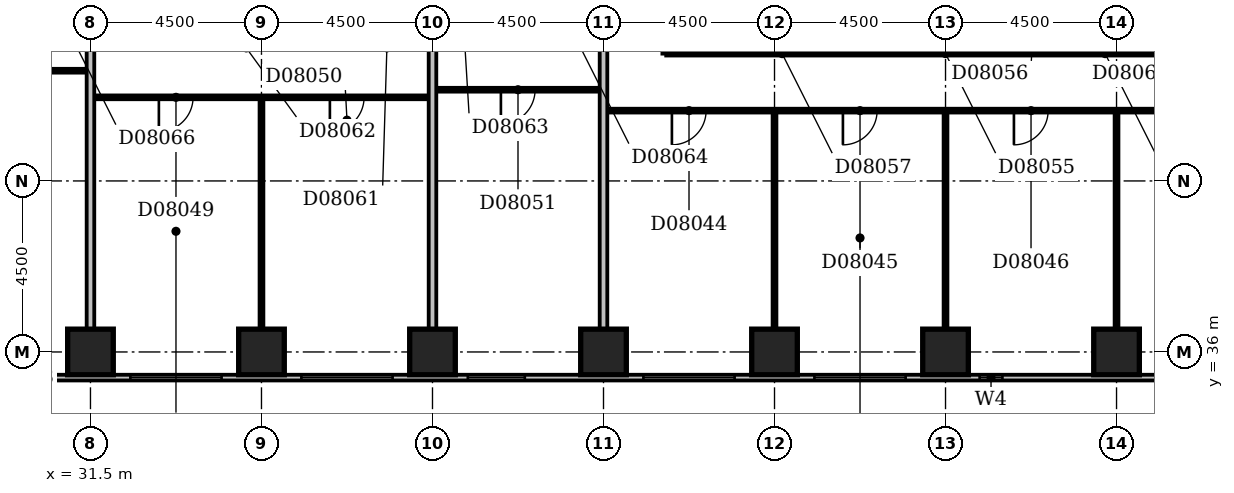
"""IFC4 building model, lengths in metres.
Left out: names, types, materials, properties, quantities, classifications, styles, units other than length and angle.
Written with IfcOpenShell. Run it as: python <this file> out.ifc"""

import sys

from ifc_helpers import new_model, si_unit, direction, frame, frame_2d, origin, origin_2d, place, context, subcontext, project, spatial, rectangle, extrude, element, fill, save


model = new_model("IFC4")
c1 = context("Model", 3, precision=1e-05, world=origin(), true_north=direction((0.0, 1.0)))
c2 = subcontext(c1, "Body", "Model", "MODEL_VIEW")
j1 = project(units=[si_unit("LENGTHUNIT", "METRE"), si_unit("PLANEANGLEUNIT", "RADIAN")], contexts=[c1])
p1 = place(None, origin())
s1 = spatial("IfcSite", under=j1, at=p1, CompositionType="ELEMENT")
p2 = place(p1, origin())
s2 = spatial("IfcBuilding", under=s1, at=p2, CompositionType="ELEMENT")
p3 = place(p2, frame((0.0, 0.0, 39.8)))
s3 = spatial("IfcBuildingStorey", under=s2, at=p3, CompositionType="ELEMENT", Elevation=39.8)
for number, where, z_axis, x_axis in (
    (1, (31.5, 36.0, -0.3), (0.0, 0.0, 1.0), (1.0, 0.0, 0.0)),
    (2, (36.0, 36.0, -0.3), (0.0, 0.0, 1.0), (1.0, 0.0, 0.0)),
    (3, (40.5, 36.0, -0.3), (0.0, 0.0, 1.0), (1.0, 0.0, 0.0)),
    (4, (45.0, 36.0, -0.3), (0.0, 0.0, 1.0), (1.0, 0.0, 0.0)),
    (5, (49.5, 36.0, -0.3), (0.0, 0.0, 1.0), (1.0, 0.0, 0.0)),
    (6, (54.0, 36.0, -0.3), (0.0, 0.0, 1.0), (1.0, 0.0, 0.0)),
    (7, (58.5, 36.0, -0.3), (0.0, 0.0, 1.0), (1.0, 0.0, 0.0)),
):
    element("IfcColumn", number, at=place(p3, frame(where, z_axis=z_axis, x_axis=x_axis)), inside=s3, PredefinedType="COLUMN", context=c2, shape_type="SweptSolid", body=[
        extrude(rectangle(XDim=1.2, YDim=1.2, at=origin_2d()), origin(), (0.0, 0.0, 1.0), 3.6),
    ])
p4 = place(p3, frame((23.1, 35.325, 0.0), z_axis=(0.0, 0.0, 1.0), x_axis=(1.0, 0.0, 0.0)))
e8 = element("IfcWall", 8, at=p4, inside=s3, PredefinedType="STANDARD", context=c2, shape_type="SweptSolid", body=[
    extrude(rectangle(XDim=45.15, YDim=0.15, at=frame_2d((22.575, 0.0))), origin(), (0.0, 0.0, 1.0), 2.7),
])
p5 = place(p4, frame((0.45, 0.0, 0.6)))
e9 = element("IfcOpeningElement", 9, at=p5, cuts=e8, PredefinedType="OPENING", context=c2, shape_type="SweptSolid", body=[
    extrude(rectangle(XDim=2.4, YDim=1.8, at=frame_2d((1.2, 0.9))), frame((0.0, 0.087, 0.0), z_axis=(0.0, -1.0, 0.0), x_axis=(1.0, 0.0, 0.0)), (0.0, 0.0, 1.0), 0.174),
])
p6 = place(p4, frame((6.56, 0.0, 0.6)))
e10 = element("IfcOpeningElement", 10, at=p6, cuts=e8, PredefinedType="OPENING", context=c2, shape_type="SweptSolid", body=[
    extrude(rectangle(XDim=0.9, YDim=1.8, at=frame_2d((0.45, 0.9))), frame((0.0, 0.087, 0.0), z_axis=(0.0, -1.0, 0.0), x_axis=(1.0, 0.0, 0.0)), (0.0, 0.0, 1.0), 0.174),
])
p7 = place(p4, frame((9.45, 0.0, 0.6)))
e11 = element("IfcOpeningElement", 11, at=p7, cuts=e8, PredefinedType="OPENING", context=c2, shape_type="SweptSolid", body=[
    extrude(rectangle(XDim=2.4, YDim=1.8, at=frame_2d((1.2, 0.9))), frame((0.0, 0.087, 0.0), z_axis=(0.0, -1.0, 0.0), x_axis=(1.0, 0.0, 0.0)), (0.0, 0.0, 1.0), 0.174),
])
p8 = place(p4, frame((13.95, 0.0, 0.6)))
e12 = element("IfcOpeningElement", 12, at=p8, cuts=e8, PredefinedType="OPENING", context=c2, shape_type="SweptSolid", body=[
    extrude(rectangle(XDim=2.4, YDim=1.8, at=frame_2d((1.2, 0.9))), frame((0.0, 0.087, 0.0), z_axis=(0.0, -1.0, 0.0), x_axis=(1.0, 0.0, 0.0)), (0.0, 0.0, 1.0), 0.174),
])
p9 = place(p4, frame((18.33, 0.0, 0.6)))
e13 = element("IfcOpeningElement", 13, at=p9, cuts=e8, PredefinedType="OPENING", context=c2, shape_type="SweptSolid", body=[
    extrude(rectangle(XDim=1.5, YDim=1.8, at=frame_2d((0.75, 0.9))), frame((0.0, 0.087, 0.0), z_axis=(0.0, -1.0, 0.0), x_axis=(1.0, 0.0, 0.0)), (0.0, 0.0, 1.0), 0.174),
])
p10 = place(p4, frame((22.95, 0.0, 0.6)))
e14 = element("IfcOpeningElement", 14, at=p10, cuts=e8, PredefinedType="OPENING", context=c2, shape_type="SweptSolid", body=[
    extrude(rectangle(XDim=2.4, YDim=1.8, at=frame_2d((1.2, 0.9))), frame((0.0, 0.087, 0.0), z_axis=(0.0, -1.0, 0.0), x_axis=(1.0, 0.0, 0.0)), (0.0, 0.0, 1.0), 0.174),
])
p11 = place(p4, frame((27.45, 0.0, 0.6)))
e15 = element("IfcOpeningElement", 15, at=p11, cuts=e8, PredefinedType="OPENING", context=c2, shape_type="SweptSolid", body=[
    extrude(rectangle(XDim=2.4, YDim=1.8, at=frame_2d((1.2, 0.9))), frame((0.0, 0.087, 0.0), z_axis=(0.0, -1.0, 0.0), x_axis=(1.0, 0.0, 0.0)), (0.0, 0.0, 1.0), 0.174),
])
p12 = place(p4, frame((31.797, 0.0, 0.6)))
e16 = element("IfcOpeningElement", 16, at=p12, cuts=e8, PredefinedType="OPENING", context=c2, shape_type="SweptSolid", body=[
    extrude(rectangle(XDim=0.6, YDim=1.8, at=frame_2d((0.3, 0.9))), frame((0.0, 0.087, 0.0), z_axis=(0.0, -1.0, 0.0), x_axis=(1.0, 0.0, 0.0)), (0.0, 0.0, 1.0), 0.174),
])
p13 = place(p4, frame((36.45, 0.0, 0.6)))
e17 = element("IfcOpeningElement", 17, at=p13, cuts=e8, PredefinedType="OPENING", context=c2, shape_type="SweptSolid", body=[
    extrude(rectangle(XDim=2.4, YDim=1.8, at=frame_2d((1.2, 0.9))), frame((0.0, 0.087, 0.0), z_axis=(0.0, -1.0, 0.0), x_axis=(1.0, 0.0, 0.0)), (0.0, 0.0, 1.0), 0.174),
])
p14 = place(p4, frame((40.95, 0.0, 0.6)))
e18 = element("IfcOpeningElement", 18, at=p14, cuts=e8, PredefinedType="OPENING", context=c2, shape_type="SweptSolid", body=[
    extrude(rectangle(XDim=2.4, YDim=1.8, at=frame_2d((1.2, 0.9))), frame((0.0, 0.087, 0.0), z_axis=(0.0, -1.0, 0.0), x_axis=(1.0, 0.0, 0.0)), (0.0, 0.0, 1.0), 0.174),
])
p15 = place(p3, frame((31.5, 36.6, 0.0), z_axis=(0.0, 0.0, 1.0), x_axis=(0.0, 1.0, 0.0)))
e19 = element("IfcWall", 19, at=p15, inside=s3, PredefinedType="PARTITIONING", context=c2, shape_type="SweptSolid", body=[
    extrude(rectangle(XDim=12.8, YDim=0.2, at=frame_2d((6.4, 0.0))), origin(), (0.0, 0.0, 1.0), 3.3),
])
p16 = place(p3, frame((36.0, 36.6, 0.0), z_axis=(0.0, 0.0, 1.0), x_axis=(0.0, 1.0, 0.0)))
e20 = element("IfcWall", 20, at=p16, inside=s3, PredefinedType="PARTITIONING", context=c2, shape_type="SweptSolid", body=[
    extrude(rectangle(XDim=6.05, YDim=0.1, at=frame_2d((3.025, 0.0))), origin(), (0.0, 0.0, 1.0), 2.4),
])
p17 = place(p3, frame((40.5, 36.6, 0.0), z_axis=(0.0, 0.0, 1.0), x_axis=(0.0, 1.0, 0.0)))
e21 = element("IfcWall", 21, at=p17, inside=s3, PredefinedType="PARTITIONING", context=c2, shape_type="SweptSolid", body=[
    extrude(rectangle(XDim=12.8, YDim=0.2, at=frame_2d((6.4, 0.0))), origin(), (0.0, 0.0, 1.0), 3.3),
])
p18 = place(p3, frame((45.0, 36.6, 0.0), z_axis=(0.0, 0.0, 1.0), x_axis=(0.0, 1.0, 0.0)))
e22 = element("IfcWall", 22, at=p18, inside=s3, PredefinedType="PARTITIONING", context=c2, shape_type="SweptSolid", body=[
    extrude(rectangle(XDim=12.8, YDim=0.2, at=frame_2d((6.4, 0.0))), origin(), (0.0, 0.0, 1.0), 2.6),
])
p19 = place(p3, frame((49.5, 36.6, 0.0), z_axis=(0.0, 0.0, 1.0), x_axis=(0.0, 1.0, 0.0)))
e23 = element("IfcWall", 23, at=p19, inside=s3, PredefinedType="PARTITIONING", context=c2, shape_type="SweptSolid", body=[
    extrude(rectangle(XDim=5.7, YDim=0.1, at=frame_2d((2.85, 0.0))), origin(), (0.0, 0.0, 1.0), 3.3),
])
p20 = place(p3, frame((54.0, 36.6, 0.0), z_axis=(0.0, 0.0, 1.0), x_axis=(0.0, 1.0, 0.0)))
e24 = element("IfcWall", 24, at=p20, inside=s3, PredefinedType="PARTITIONING", context=c2, shape_type="SweptSolid", body=[
    extrude(rectangle(XDim=5.7, YDim=0.1, at=frame_2d((2.85, 0.0))), origin(), (0.0, 0.0, 1.0), 2.6),
])
p21 = place(p3, frame((58.5, 36.6, 0.0), z_axis=(0.0, 0.0, 1.0), x_axis=(0.0, 1.0, 0.0)))
e25 = element("IfcWall", 25, at=p21, inside=s3, PredefinedType="PARTITIONING", context=c2, shape_type="SweptSolid", body=[
    extrude(rectangle(XDim=5.7, YDim=0.1, at=frame_2d((2.85, 0.0))), origin(), (0.0, 0.0, 1.0), 3.3),
])
p22 = place(p3, frame((45.1, 42.35, 0.0), z_axis=(0.0, 0.0, 1.0), x_axis=(1.0, 0.0, 0.0)))
e26 = element("IfcWall", 26, at=p22, inside=s3, PredefinedType="PARTITIONING", context=c2, shape_type="SweptSolid", body=[
    extrude(rectangle(XDim=17.8, YDim=0.1, at=frame_2d((8.9, 0.0))), origin(), (0.0, 0.0, 1.0), 3.3),
])
p23 = place(p22, frame((1.7, 0.0, 0.0)))
e27 = element("IfcOpeningElement", 27, at=p23, cuts=e26, PredefinedType="OPENING", context=c2, shape_type="SweptSolid", body=[
    extrude(rectangle(XDim=0.9, YDim=2.1, at=frame_2d((0.45, 1.05))), frame((0.0, 0.062, 0.0), z_axis=(0.0, -1.0, 0.0), x_axis=(1.0, 0.0, 0.0)), (0.0, 0.0, 1.0), 0.124),
])
p24 = place(p22, frame((6.2, 0.0, 0.0)))
e28 = element("IfcOpeningElement", 28, at=p24, cuts=e26, PredefinedType="OPENING", context=c2, shape_type="SweptSolid", body=[
    extrude(rectangle(XDim=0.9, YDim=2.1, at=frame_2d((0.45, 1.05))), frame((0.0, 0.062, 0.0), z_axis=(0.0, -1.0, 0.0), x_axis=(1.0, 0.0, 0.0)), (0.0, 0.0, 1.0), 0.124),
])
p25 = place(p22, frame((10.7, 0.0, 0.0)))
e29 = element("IfcOpeningElement", 29, at=p25, cuts=e26, PredefinedType="OPENING", context=c2, shape_type="SweptSolid", body=[
    extrude(rectangle(XDim=0.9, YDim=2.1, at=frame_2d((0.45, 1.05))), frame((0.0, 0.062, 0.0), z_axis=(0.0, -1.0, 0.0), x_axis=(1.0, 0.0, 0.0)), (0.0, 0.0, 1.0), 0.124),
])
p26 = place(p22, frame((15.2, 0.0, 0.0)))
e30 = element("IfcOpeningElement", 30, at=p26, cuts=e26, PredefinedType="OPENING", context=c2, shape_type="SweptSolid", body=[
    extrude(rectangle(XDim=0.9, YDim=2.1, at=frame_2d((0.45, 1.05))), frame((0.0, 0.062, 0.0), z_axis=(0.0, -1.0, 0.0), x_axis=(1.0, 0.0, 0.0)), (0.0, 0.0, 1.0), 0.124),
])
p27 = place(p3, frame((31.6, 42.7, 0.0), z_axis=(0.0, 0.0, 1.0), x_axis=(1.0, 0.0, 0.0)))
e31 = element("IfcWall", 31, at=p27, inside=s3, PredefinedType="PARTITIONING", context=c2, shape_type="SweptSolid", body=[
    extrude(rectangle(XDim=8.8, YDim=0.1, at=frame_2d((4.4, 0.0))), origin(), (0.0, 0.0, 1.0), 3.3),
])
p28 = place(p27, frame((1.7, 0.0, 0.0)))
e32 = element("IfcOpeningElement", 32, at=p28, cuts=e31, PredefinedType="OPENING", context=c2, shape_type="SweptSolid", body=[
    extrude(rectangle(XDim=0.9, YDim=2.1, at=frame_2d((0.45, 1.05))), frame((0.0, 0.062, 0.0), z_axis=(0.0, -1.0, 0.0), x_axis=(1.0, 0.0, 0.0)), (0.0, 0.0, 1.0), 0.124),
])
p29 = place(p27, frame((6.2, 0.0, 0.0)))
e33 = element("IfcOpeningElement", 33, at=p29, cuts=e31, PredefinedType="OPENING", context=c2, shape_type="SweptSolid", body=[
    extrude(rectangle(XDim=0.9, YDim=2.1, at=frame_2d((0.45, 1.05))), frame((0.0, 0.062, 0.0), z_axis=(0.0, -1.0, 0.0), x_axis=(1.0, 0.0, 0.0)), (0.0, 0.0, 1.0), 0.124),
])
p30 = place(p3, frame((40.6, 42.9, 0.0), z_axis=(0.0, 0.0, 1.0), x_axis=(1.0, 0.0, 0.0)))
e34 = element("IfcWall", 34, at=p30, inside=s3, PredefinedType="PARTITIONING", context=c2, shape_type="SweptSolid", body=[
    extrude(rectangle(XDim=4.3, YDim=0.1, at=frame_2d((2.15, 0.0))), origin(), (0.0, 0.0, 1.0), 3.3),
])
p31 = place(p30, frame((1.7, 0.0, 0.0)))
e35 = element("IfcOpeningElement", 35, at=p31, cuts=e34, PredefinedType="OPENING", context=c2, shape_type="SweptSolid", body=[
    extrude(rectangle(XDim=0.9, YDim=2.1, at=frame_2d((0.45, 1.05))), frame((0.0, 0.062, 0.0), z_axis=(0.0, -1.0, 0.0), x_axis=(1.0, 0.0, 0.0)), (0.0, 0.0, 1.0), 0.124),
])
p32 = place(p3, frame((27.1, 43.4, 0.0), z_axis=(0.0, 0.0, 1.0), x_axis=(1.0, 0.0, 0.0)))
e36 = element("IfcWall", 36, at=p32, inside=s3, PredefinedType="PARTITIONING", context=c2, shape_type="SweptSolid", body=[
    extrude(rectangle(XDim=4.3, YDim=0.1, at=frame_2d((2.15, 0.0))), origin(), (0.0, 0.0, 1.0), 3.3),
])
p33 = place(p32, frame((1.7, 0.0, 0.0)))
e37 = element("IfcOpeningElement", 37, at=p33, cuts=e36, PredefinedType="OPENING", context=c2, shape_type="SweptSolid", body=[
    extrude(rectangle(XDim=0.9, YDim=2.1, at=frame_2d((0.45, 1.05))), frame((0.0, 0.062, 0.0), z_axis=(0.0, -1.0, 0.0), x_axis=(1.0, 0.0, 0.0)), (0.0, 0.0, 1.0), 0.124),
])
p34 = place(p3, frame((46.6, 43.85, 0.0), z_axis=(0.0, 0.0, 1.0), x_axis=(0.0, 1.0, 0.0)))
e38 = element("IfcWall", 38, at=p34, inside=s3, PredefinedType="PARTITIONING", context=c2, shape_type="SweptSolid", body=[
    extrude(rectangle(XDim=5.55, YDim=0.1, at=frame_2d((2.775, 0.0))), origin(), (0.0, 0.0, 1.0), 3.3),
])
p35 = place(p3, frame((46.65, 43.85, 0.0), z_axis=(0.0, 0.0, 1.0), x_axis=(1.0, 0.0, 0.0)))
e39 = element("IfcWall", 39, at=p35, inside=s3, PredefinedType="PARTITIONING", context=c2, shape_type="SweptSolid", body=[
    extrude(rectangle(XDim=16.25, YDim=0.1, at=frame_2d((8.125, 0.0))), origin(), (0.0, 0.0, 1.0), 3.3),
])
p36 = place(p35, frame((6.95, 0.0, 0.0)))
e40 = element("IfcOpeningElement", 40, at=p36, cuts=e39, PredefinedType="OPENING", context=c2, shape_type="SweptSolid", body=[
    extrude(rectangle(XDim=0.8, YDim=2.1, at=frame_2d((0.4, 1.05))), frame((0.0, 0.062, 0.0), z_axis=(0.0, -1.0, 0.0), x_axis=(1.0, 0.0, 0.0)), (0.0, 0.0, 1.0), 0.124),
])
p37 = place(p35, frame((9.25, 0.0, 0.0)))
e41 = element("IfcOpeningElement", 41, at=p37, cuts=e39, PredefinedType="OPENING", context=c2, shape_type="SweptSolid", body=[
    extrude(rectangle(XDim=0.8, YDim=2.1, at=frame_2d((0.4, 1.05))), frame((0.0, 0.062, 0.0), z_axis=(0.0, -1.0, 0.0), x_axis=(1.0, 0.0, 0.0)), (0.0, 0.0, 1.0), 0.124),
])
p38 = place(p35, frame((2.6, 0.0, 0.0)))
e42 = element("IfcOpeningElement", 42, at=p38, cuts=e39, PredefinedType="OPENING", context=c2, shape_type="SweptSolid", body=[
    extrude(rectangle(XDim=0.9, YDim=2.1, at=frame_2d((0.45, 1.05))), frame((0.0, 0.062, 0.0), z_axis=(0.0, -1.0, 0.0), x_axis=(1.0, 0.0, 0.0)), (0.0, 0.0, 1.0), 0.124),
])
p39 = place(p35, frame((14.95, 0.0, 0.0)))
e43 = element("IfcOpeningElement", 43, at=p39, cuts=e39, PredefinedType="OPENING", context=c2, shape_type="SweptSolid", body=[
    extrude(rectangle(XDim=0.8, YDim=2.1, at=frame_2d((0.4, 1.05))), frame((0.0, 0.062, 0.0), z_axis=(0.0, -1.0, 0.0), x_axis=(1.0, 0.0, 0.0)), (0.0, 0.0, 1.0), 0.124),
])
p40 = place(p35, frame((11.15, 0.0, 0.0)))
e44 = element("IfcOpeningElement", 44, at=p40, cuts=e39, PredefinedType="OPENING", context=c2, shape_type="SweptSolid", body=[
    extrude(rectangle(XDim=0.8, YDim=2.1, at=frame_2d((0.4, 1.05))), frame((0.0, 0.062, 0.0), z_axis=(0.0, -1.0, 0.0), x_axis=(1.0, 0.0, 0.0)), (0.0, 0.0, 1.0), 0.124),
])
p41 = place(p35, frame((12.95, 0.0, 0.0)))
e45 = element("IfcOpeningElement", 45, at=p41, cuts=e39, PredefinedType="OPENING", context=c2, shape_type="SweptSolid", body=[
    extrude(rectangle(XDim=0.8, YDim=2.1, at=frame_2d((0.4, 1.05))), frame((0.0, 0.062, 0.0), z_axis=(0.0, -1.0, 0.0), x_axis=(1.0, 0.0, 0.0)), (0.0, 0.0, 1.0), 0.124),
])
p42 = place(p6, origin())
e46 = element("IfcWindow", 46, at=p42, inside=s3, PartitioningType="SINGLE_PANEL", PredefinedType="WINDOW", context=c2, shape_type="SweptSolid", body=[
    extrude(rectangle(XDim=0.9, YDim=1.8, at=frame_2d((0.45, 0.9))), frame((0.0, 0.03, 0.0), z_axis=(0.0, -1.0, 0.0), x_axis=(1.0, 0.0, 0.0)), (0.0, 0.0, 1.0), 0.06),
])
fill(e10, e46)
p43 = place(p7, origin())
e47 = element("IfcWindow", 47, at=p43, inside=s3, PartitioningType="SINGLE_PANEL", PredefinedType="WINDOW", context=c2, shape_type="SweptSolid", body=[
    extrude(rectangle(XDim=2.4, YDim=1.8, at=frame_2d((1.2, 0.9))), frame((0.0, 0.03, 0.0), z_axis=(0.0, -1.0, 0.0), x_axis=(1.0, 0.0, 0.0)), (0.0, 0.0, 1.0), 0.06),
])
fill(e11, e47)
p44 = place(p8, origin())
e48 = element("IfcWindow", 48, at=p44, inside=s3, PartitioningType="SINGLE_PANEL", PredefinedType="WINDOW", context=c2, shape_type="SweptSolid", body=[
    extrude(rectangle(XDim=2.4, YDim=1.8, at=frame_2d((1.2, 0.9))), frame((0.0, 0.03, 0.0), z_axis=(0.0, -1.0, 0.0), x_axis=(1.0, 0.0, 0.0)), (0.0, 0.0, 1.0), 0.06),
])
fill(e12, e48)
p45 = place(p9, origin())
e49 = element("IfcWindow", 49, at=p45, inside=s3, PartitioningType="SINGLE_PANEL", PredefinedType="WINDOW", context=c2, shape_type="SweptSolid", body=[
    extrude(rectangle(XDim=1.5, YDim=1.8, at=frame_2d((0.75, 0.9))), frame((0.0, 0.03, 0.0), z_axis=(0.0, -1.0, 0.0), x_axis=(1.0, 0.0, 0.0)), (0.0, 0.0, 1.0), 0.06),
])
fill(e13, e49)
p46 = place(p10, origin())
e50 = element("IfcWindow", 50, at=p46, inside=s3, PartitioningType="SINGLE_PANEL", PredefinedType="WINDOW", context=c2, shape_type="SweptSolid", body=[
    extrude(rectangle(XDim=2.4, YDim=1.8, at=frame_2d((1.2, 0.9))), frame((0.0, 0.03, 0.0), z_axis=(0.0, -1.0, 0.0), x_axis=(1.0, 0.0, 0.0)), (0.0, 0.0, 1.0), 0.06),
])
fill(e14, e50)
p47 = place(p11, origin())
e51 = element("IfcWindow", 51, at=p47, inside=s3, PartitioningType="SINGLE_PANEL", PredefinedType="WINDOW", context=c2, shape_type="SweptSolid", body=[
    extrude(rectangle(XDim=2.4, YDim=1.8, at=frame_2d((1.2, 0.9))), frame((0.0, 0.03, 0.0), z_axis=(0.0, -1.0, 0.0), x_axis=(1.0, 0.0, 0.0)), (0.0, 0.0, 1.0), 0.06),
])
fill(e15, e51)
p48 = place(p12, origin())
e52 = element("IfcWindow", 52, at=p48, inside=s3, PartitioningType="SINGLE_PANEL", PredefinedType="WINDOW", context=c2, shape_type="SweptSolid", body=[
    extrude(rectangle(XDim=0.6, YDim=1.8, at=frame_2d((0.3, 0.9))), frame((0.0, 0.03, 0.0), z_axis=(0.0, -1.0, 0.0), x_axis=(1.0, 0.0, 0.0)), (0.0, 0.0, 1.0), 0.06),
])
fill(e16, e52)
p49 = place(p23, frame((0.9, 0.0, 0.0), z_axis=(0.0, 0.0, 1.0), x_axis=(-1.0, 0.0, 0.0)))
e53 = element("IfcDoor", 53, at=p49, inside=s3, OperationType="SINGLE_SWING_RIGHT", PredefinedType="DOOR", context=c2, shape_type="SweptSolid", body=[
    extrude(rectangle(XDim=0.9, YDim=2.1, at=frame_2d((0.45, 1.05))), frame((0.0, 0.025, 0.0), z_axis=(0.0, -1.0, 0.0), x_axis=(1.0, 0.0, 0.0)), (0.0, 0.0, 1.0), 0.05),
])
fill(e27, e53)
p50 = place(p24, frame((0.9, 0.0, 0.0), z_axis=(0.0, 0.0, 1.0), x_axis=(-1.0, 0.0, 0.0)))
e54 = element("IfcDoor", 54, at=p50, inside=s3, OperationType="SINGLE_SWING_RIGHT", PredefinedType="DOOR", context=c2, shape_type="SweptSolid", body=[
    extrude(rectangle(XDim=0.9, YDim=2.1, at=frame_2d((0.45, 1.05))), frame((0.0, 0.025, 0.0), z_axis=(0.0, -1.0, 0.0), x_axis=(1.0, 0.0, 0.0)), (0.0, 0.0, 1.0), 0.05),
])
fill(e28, e54)
p51 = place(p25, frame((0.9, 0.0, 0.0), z_axis=(0.0, 0.0, 1.0), x_axis=(-1.0, 0.0, 0.0)))
e55 = element("IfcDoor", 55, at=p51, inside=s3, OperationType="SINGLE_SWING_RIGHT", PredefinedType="DOOR", context=c2, shape_type="SweptSolid", body=[
    extrude(rectangle(XDim=0.9, YDim=2.1, at=frame_2d((0.45, 1.05))), frame((0.0, 0.025, 0.0), z_axis=(0.0, -1.0, 0.0), x_axis=(1.0, 0.0, 0.0)), (0.0, 0.0, 1.0), 0.05),
])
fill(e29, e55)
p52 = place(p28, frame((0.9, 0.0, 0.0), z_axis=(0.0, 0.0, 1.0), x_axis=(-1.0, 0.0, 0.0)))
e56 = element("IfcDoor", 56, at=p52, inside=s3, OperationType="SINGLE_SWING_RIGHT", PredefinedType="DOOR", context=c2, shape_type="SweptSolid", body=[
    extrude(rectangle(XDim=0.9, YDim=2.1, at=frame_2d((0.45, 1.05))), frame((0.0, 0.025, 0.0), z_axis=(0.0, -1.0, 0.0), x_axis=(1.0, 0.0, 0.0)), (0.0, 0.0, 1.0), 0.05),
])
fill(e32, e56)
p53 = place(p29, frame((0.9, 0.0, 0.0), z_axis=(0.0, 0.0, 1.0), x_axis=(-1.0, 0.0, 0.0)))
e57 = element("IfcDoor", 57, at=p53, inside=s3, OperationType="SINGLE_SWING_RIGHT", PredefinedType="DOOR", context=c2, shape_type="SweptSolid", body=[
    extrude(rectangle(XDim=0.9, YDim=2.1, at=frame_2d((0.45, 1.05))), frame((0.0, 0.025, 0.0), z_axis=(0.0, -1.0, 0.0), x_axis=(1.0, 0.0, 0.0)), (0.0, 0.0, 1.0), 0.05),
])
fill(e33, e57)
p54 = place(p31, frame((0.9, 0.0, 0.0), z_axis=(0.0, 0.0, 1.0), x_axis=(-1.0, 0.0, 0.0)))
e58 = element("IfcDoor", 58, at=p54, inside=s3, OperationType="SINGLE_SWING_RIGHT", PredefinedType="DOOR", context=c2, shape_type="SweptSolid", body=[
    extrude(rectangle(XDim=0.9, YDim=2.1, at=frame_2d((0.45, 1.05))), frame((0.0, 0.025, 0.0), z_axis=(0.0, -1.0, 0.0), x_axis=(1.0, 0.0, 0.0)), (0.0, 0.0, 1.0), 0.05),
])
fill(e35, e58)
p55 = place(p36, origin())
e59 = element("IfcDoor", 59, at=p55, inside=s3, OperationType="SINGLE_SWING_LEFT", PredefinedType="DOOR", context=c2, shape_type="SweptSolid", body=[
    extrude(rectangle(XDim=0.8, YDim=2.1, at=frame_2d((0.4, 1.05))), frame((0.0, 0.025, 0.0), z_axis=(0.0, -1.0, 0.0), x_axis=(1.0, 0.0, 0.0)), (0.0, 0.0, 1.0), 0.05),
])
fill(e40, e59)
p56 = place(p37, origin())
e60 = element("IfcDoor", 60, at=p56, inside=s3, OperationType="SINGLE_SWING_LEFT", PredefinedType="DOOR", context=c2, shape_type="SweptSolid", body=[
    extrude(rectangle(XDim=0.8, YDim=2.1, at=frame_2d((0.4, 1.05))), frame((0.0, 0.025, 0.0), z_axis=(0.0, -1.0, 0.0), x_axis=(1.0, 0.0, 0.0)), (0.0, 0.0, 1.0), 0.05),
])
fill(e41, e60)
p57 = place(p38, origin())
e61 = element("IfcDoor", 61, at=p57, inside=s3, OperationType="SINGLE_SWING_LEFT", PredefinedType="DOOR", context=c2, shape_type="SweptSolid", body=[
    extrude(rectangle(XDim=0.9, YDim=2.1, at=frame_2d((0.45, 1.05))), frame((0.0, 0.025, 0.0), z_axis=(0.0, -1.0, 0.0), x_axis=(1.0, 0.0, 0.0)), (0.0, 0.0, 1.0), 0.05),
])
fill(e42, e61)
p58 = place(p40, origin())
e62 = element("IfcDoor", 62, at=p58, inside=s3, OperationType="SINGLE_SWING_LEFT", PredefinedType="DOOR", context=c2, shape_type="SweptSolid", body=[
    extrude(rectangle(XDim=0.8, YDim=2.1, at=frame_2d((0.4, 1.05))), frame((0.0, 0.025, 0.0), z_axis=(0.0, -1.0, 0.0), x_axis=(1.0, 0.0, 0.0)), (0.0, 0.0, 1.0), 0.05),
])
fill(e44, e62)
save(model, sys.argv[1])
